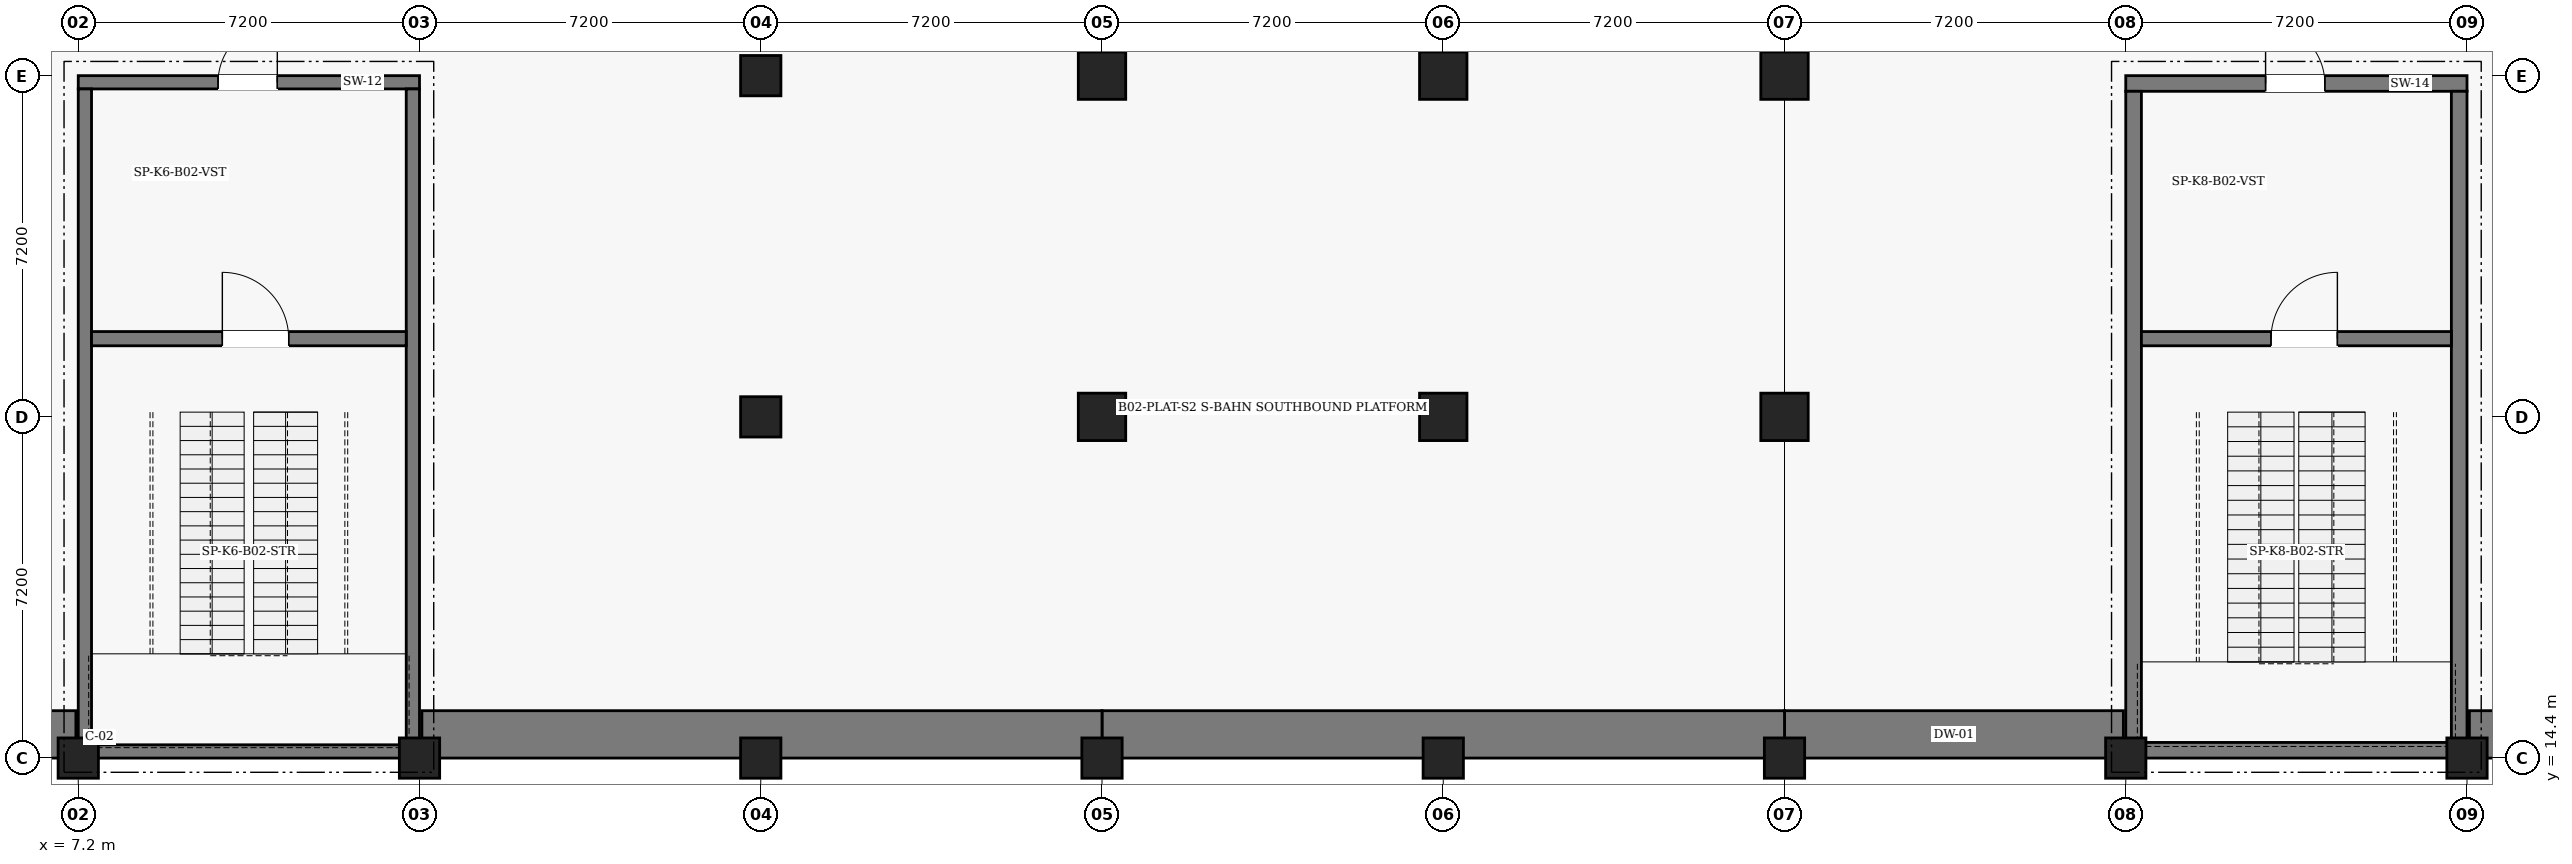
"""IFC4 building model, lengths in metres.
Left out: names, types, materials, properties, quantities, classifications, styles, units other than length and angle.
Written with IfcOpenShell. Run it as: python <this file> out.ifc"""

import sys

from ifc_helpers import new_model, si_unit, direction, frame, frame_2d, origin, origin_2d, place, context, subcontext, project, spatial, rectangle, extrude, element, fill, save


model = new_model("IFC4")
c1 = context("Model", 3, precision=1e-05, world=origin(), true_north=direction((0.0, 1.0)))
c2 = subcontext(c1, "Body", "Model", "MODEL_VIEW")
j1 = project(units=[si_unit("LENGTHUNIT", "METRE"), si_unit("PLANEANGLEUNIT", "RADIAN")], contexts=[c1])
p1 = place(None, origin())
s1 = spatial("IfcSite", under=j1, at=p1, CompositionType="ELEMENT")
p2 = place(p1, origin())
s2 = spatial("IfcBuilding", under=s1, at=p2, CompositionType="ELEMENT")
p3 = place(p2, frame((0.0, 0.0, -10.8)))
s3 = spatial("IfcBuildingStorey", under=s2, at=p3, CompositionType="ELEMENT", Elevation=-10.8)
p4 = place(p3, frame((72.0, 14.9, 0.0), z_axis=(0.0, 0.0, 1.0), x_axis=(-1.0, 0.0, 0.0)))
e1 = element("IfcWall", 1, at=p4, inside=s3, PredefinedType="USERDEFINED", context=c2, shape_type="SweptSolid", body=[
    extrude(rectangle(XDim=14.35, YDim=1.0, at=frame_2d((7.175, 0.0))), origin(), (0.0, 0.0, 1.0), 5.0),
])
p5 = place(p3, frame((50.35, 14.9, 0.0), z_axis=(0.0, 0.0, 1.0), x_axis=(-1.0, 0.0, 0.0)))
e2 = element("IfcWall", 2, at=p5, inside=s3, PredefinedType="USERDEFINED", context=c2, shape_type="SweptSolid", body=[
    extrude(rectangle(XDim=7.15, YDim=1.0, at=frame_2d((3.575, 0.0))), origin(), (0.0, 0.0, 1.0), 5.0),
])
p6 = place(p3, frame((43.2, 14.9, 0.0), z_axis=(0.0, 0.0, 1.0), x_axis=(-1.0, 0.0, 0.0)))
e3 = element("IfcWall", 3, at=p6, inside=s3, PredefinedType="USERDEFINED", context=c2, shape_type="SweptSolid", body=[
    extrude(rectangle(XDim=14.4, YDim=1.0, at=frame_2d((7.2, 0.0))), origin(), (0.0, 0.0, 1.0), 5.0),
])
p7 = place(p3, frame((28.8, 14.9, 0.0), z_axis=(0.0, 0.0, 1.0), x_axis=(-1.0, 0.0, 0.0)))
e4 = element("IfcWall", 4, at=p7, inside=s3, PredefinedType="USERDEFINED", context=c2, shape_type="SweptSolid", body=[
    extrude(rectangle(XDim=14.35, YDim=1.0, at=frame_2d((7.175, 0.0))), origin(), (0.0, 0.0, 1.0), 5.0),
])
p8 = place(p3, frame((7.15, 14.9, 0.0), z_axis=(0.0, 0.0, 1.0), x_axis=(-1.0, 0.0, 0.0)))
e5 = element("IfcWall", 5, at=p8, inside=s3, PredefinedType="USERDEFINED", context=c2, shape_type="SweptSolid", body=[
    extrude(rectangle(XDim=7.15, YDim=1.0, at=frame_2d((3.575, 0.0))), origin(), (0.0, 0.0, 1.0), 5.0),
])
p9 = place(p3, frame((7.2, 28.66, 0.0), z_axis=(0.0, 0.0, 1.0), x_axis=(1.0, 0.0, 0.0)))
e6 = element("IfcWall", 6, at=p9, inside=s3, PredefinedType="SHEAR", context=c2, shape_type="SweptSolid", body=[
    extrude(rectangle(XDim=7.2, YDim=0.28, at=frame_2d((3.6, 0.0))), origin(), (0.0, 0.0, 1.0), 5.4),
])
p10 = place(p9, frame((2.95, 0.0, 0.0)))
e7 = element("IfcOpeningElement", 7, at=p10, cuts=e6, PredefinedType="OPENING", context=c2, shape_type="SweptSolid", body=[
    extrude(rectangle(XDim=1.25, YDim=2.2, at=frame_2d((0.625, 1.1))), frame((0.0, 0.15, 0.0), z_axis=(0.0, -1.0, 0.0), x_axis=(1.0, 0.0, 0.0)), (0.0, 0.0, 1.0), 0.3),
])
p11 = place(p3, frame((14.26, 28.52, 0.0), z_axis=(0.0, 0.0, 1.0), x_axis=(0.0, -1.0, 0.0)))
e8 = element("IfcWall", 8, at=p11, inside=s3, PredefinedType="SHEAR", context=c2, shape_type="SweptSolid", body=[
    extrude(rectangle(XDim=13.84, YDim=0.28, at=frame_2d((6.92, 0.0))), origin(), (0.0, 0.0, 1.0), 5.4),
])
p12 = place(p3, frame((14.4, 14.54, 0.0), z_axis=(0.0, 0.0, 1.0), x_axis=(-1.0, 0.0, 0.0)))
e9 = element("IfcWall", 9, at=p12, inside=s3, PredefinedType="SHEAR", context=c2, shape_type="SweptSolid", body=[
    extrude(rectangle(XDim=7.2, YDim=0.28, at=frame_2d((3.6, 0.0))), origin(), (0.0, 0.0, 1.0), 5.4),
])
p13 = place(p3, frame((7.34, 14.68, 0.0), z_axis=(0.0, 0.0, 1.0), x_axis=(0.0, 1.0, 0.0)))
e10 = element("IfcWall", 10, at=p13, inside=s3, PredefinedType="SHEAR", context=c2, shape_type="SweptSolid", body=[
    extrude(rectangle(XDim=13.84, YDim=0.28, at=frame_2d((6.92, 0.0))), origin(), (0.0, 0.0, 1.0), 5.4),
])
p14 = place(p3, frame((7.48, 23.25, 0.0), z_axis=(0.0, 0.0, 1.0), x_axis=(1.0, 0.0, 0.0)))
e11 = element("IfcWall", 11, at=p14, inside=s3, PredefinedType="SHEAR", context=c2, shape_type="SweptSolid", body=[
    extrude(rectangle(XDim=6.64, YDim=0.3, at=frame_2d((3.32, 0.0))), origin(), (0.0, 0.0, 1.0), 5.4),
])
p15 = place(p14, frame((2.76, 0.0, 0.0)))
e12 = element("IfcOpeningElement", 12, at=p15, cuts=e11, PredefinedType="OPENING", context=c2, shape_type="SweptSolid", body=[
    extrude(rectangle(XDim=1.4, YDim=2.2, at=frame_2d((0.7, 1.1))), frame((0.0, 0.16, 0.0), z_axis=(0.0, -1.0, 0.0), x_axis=(1.0, 0.0, 0.0)), (0.0, 0.0, 1.0), 0.32),
])
p16 = place(p3, frame((50.4, 28.635, 0.0), z_axis=(0.0, 0.0, 1.0), x_axis=(1.0, 0.0, 0.0)))
e13 = element("IfcWall", 13, at=p16, inside=s3, PredefinedType="SHEAR", context=c2, shape_type="SweptSolid", body=[
    extrude(rectangle(XDim=7.2, YDim=0.33, at=frame_2d((3.6, 0.0))), origin(), (0.0, 0.0, 1.0), 5.4),
])
p17 = place(p16, frame((2.95, 0.0, 0.0)))
e14 = element("IfcOpeningElement", 14, at=p17, cuts=e13, PredefinedType="OPENING", context=c2, shape_type="SweptSolid", body=[
    extrude(rectangle(XDim=1.25, YDim=2.2, at=frame_2d((0.625, 1.1))), frame((0.0, 0.175, 0.0), z_axis=(0.0, -1.0, 0.0), x_axis=(1.0, 0.0, 0.0)), (0.0, 0.0, 1.0), 0.35),
])
p18 = place(p3, frame((57.435, 28.47, 0.0), z_axis=(0.0, 0.0, 1.0), x_axis=(0.0, -1.0, 0.0)))
e15 = element("IfcWall", 15, at=p18, inside=s3, PredefinedType="SHEAR", context=c2, shape_type="SweptSolid", body=[
    extrude(rectangle(XDim=13.74, YDim=0.33, at=frame_2d((6.87, 0.0))), origin(), (0.0, 0.0, 1.0), 5.4),
])
p19 = place(p3, frame((57.6, 14.565, 0.0), z_axis=(0.0, 0.0, 1.0), x_axis=(-1.0, 0.0, 0.0)))
e16 = element("IfcWall", 16, at=p19, inside=s3, PredefinedType="SHEAR", context=c2, shape_type="SweptSolid", body=[
    extrude(rectangle(XDim=7.2, YDim=0.33, at=frame_2d((3.6, 0.0))), origin(), (0.0, 0.0, 1.0), 5.4),
])
p20 = place(p3, frame((50.565, 14.73, 0.0), z_axis=(0.0, 0.0, 1.0), x_axis=(0.0, 1.0, 0.0)))
e17 = element("IfcWall", 17, at=p20, inside=s3, PredefinedType="SHEAR", context=c2, shape_type="SweptSolid", body=[
    extrude(rectangle(XDim=13.74, YDim=0.33, at=frame_2d((6.87, 0.0))), origin(), (0.0, 0.0, 1.0), 5.4),
])
p21 = place(p3, frame((50.73, 23.25, 0.0), z_axis=(0.0, 0.0, 1.0), x_axis=(1.0, 0.0, 0.0)))
e18 = element("IfcWall", 18, at=p21, inside=s3, PredefinedType="SHEAR", context=c2, shape_type="SweptSolid", body=[
    extrude(rectangle(XDim=6.54, YDim=0.3, at=frame_2d((3.27, 0.0))), origin(), (0.0, 0.0, 1.0), 5.4),
])
p22 = place(p21, frame((2.735, 0.0, 0.0)))
e19 = element("IfcOpeningElement", 19, at=p22, cuts=e18, PredefinedType="OPENING", context=c2, shape_type="SweptSolid", body=[
    extrude(rectangle(XDim=1.4, YDim=2.2, at=frame_2d((0.7, 1.1))), frame((0.0, 0.16, 0.0), z_axis=(0.0, -1.0, 0.0), x_axis=(1.0, 0.0, 0.0)), (0.0, 0.0, 1.0), 0.32),
])
for number, where, z_axis, x_axis in (
    (20, (7.2, 14.4, 0.0), (0.0, 0.0, 1.0), (1.0, 0.0, 0.0)),
    (21, (14.4, 14.4, 0.0), (0.0, 0.0, 1.0), (1.0, 0.0, 0.0)),
    (22, (21.6, 14.4, 0.0), (0.0, 0.0, 1.0), (1.0, 0.0, 0.0)),
    (23, (21.6, 21.6, 0.0), (0.0, 0.0, 1.0), (1.0, 0.0, 0.0)),
    (24, (21.6, 28.8, 0.0), (0.0, 0.0, 1.0), (1.0, 0.0, 0.0)),
    (25, (28.8, 14.4, 0.0), (0.0, 0.0, 1.0), (1.0, 0.0, 0.0)),
):
    element("IfcColumn", number, at=place(p3, frame(where, z_axis=z_axis, x_axis=x_axis)), inside=s3, PredefinedType="COLUMN", context=c2, shape_type="SweptSolid", body=[
        extrude(rectangle(XDim=0.85, YDim=0.85, at=origin_2d()), origin(), (0.0, 0.0, 1.0), 5.0),
    ])
for number, where, z_axis, x_axis in (
    (26, (28.8, 21.6, 0.0), (0.0, 0.0, 1.0), (1.0, 0.0, 0.0)),
    (27, (28.8, 28.8, 0.0), (0.0, 0.0, 1.0), (1.0, 0.0, 0.0)),
):
    element("IfcColumn", number, at=place(p3, frame(where, z_axis=z_axis, x_axis=x_axis)), inside=s3, PredefinedType="COLUMN", context=c2, shape_type="SweptSolid", body=[
        extrude(rectangle(XDim=1.0, YDim=1.0, at=origin_2d()), origin(), (0.0, 0.0, 1.0), 5.0),
    ])
p23 = place(p3, frame((36.0, 14.4, 0.0), z_axis=(0.0, 0.0, 1.0), x_axis=(1.0, 0.0, 0.0)))
e28 = element("IfcColumn", 28, at=p23, inside=s3, PredefinedType="COLUMN", context=c2, shape_type="SweptSolid", body=[
    extrude(rectangle(XDim=0.85, YDim=0.85, at=origin_2d()), origin(), (0.0, 0.0, 1.0), 5.0),
])
for number, where, z_axis, x_axis in (
    (29, (36.0, 21.6, 0.0), (0.0, 0.0, 1.0), (1.0, 0.0, 0.0)),
    (30, (36.0, 28.8, 0.0), (0.0, 0.0, 1.0), (1.0, 0.0, 0.0)),
):
    element("IfcColumn", number, at=place(p3, frame(where, z_axis=z_axis, x_axis=x_axis)), inside=s3, PredefinedType="COLUMN", context=c2, shape_type="SweptSolid", body=[
        extrude(rectangle(XDim=1.0, YDim=1.0, at=origin_2d()), origin(), (0.0, 0.0, 1.0), 5.0),
    ])
p24 = place(p3, frame((43.2, 14.4, 0.0), z_axis=(0.0, 0.0, 1.0), x_axis=(1.0, 0.0, 0.0)))
e31 = element("IfcColumn", 31, at=p24, inside=s3, PredefinedType="COLUMN", context=c2, shape_type="SweptSolid", body=[
    extrude(rectangle(XDim=0.85, YDim=0.85, at=origin_2d()), origin(), (0.0, 0.0, 1.0), 5.0),
])
for number, where, z_axis, x_axis in (
    (32, (43.2, 21.6, 0.0), (0.0, 0.0, 1.0), (1.0, 0.0, 0.0)),
    (33, (43.2, 28.8, 0.0), (0.0, 0.0, 1.0), (1.0, 0.0, 0.0)),
):
    element("IfcColumn", number, at=place(p3, frame(where, z_axis=z_axis, x_axis=x_axis)), inside=s3, PredefinedType="COLUMN", context=c2, shape_type="SweptSolid", body=[
        extrude(rectangle(XDim=1.0, YDim=1.0, at=origin_2d()), origin(), (0.0, 0.0, 1.0), 5.0),
    ])
for number, where, z_axis, x_axis in (
    (34, (50.4, 14.4, 0.0), (0.0, 0.0, 1.0), (1.0, 0.0, 0.0)),
    (35, (57.6, 14.4, 0.0), (0.0, 0.0, 1.0), (1.0, 0.0, 0.0)),
):
    element("IfcColumn", number, at=place(p3, frame(where, z_axis=z_axis, x_axis=x_axis)), inside=s3, PredefinedType="COLUMN", context=c2, shape_type="SweptSolid", body=[
        extrude(rectangle(XDim=0.85, YDim=0.85, at=origin_2d()), origin(), (0.0, 0.0, 1.0), 5.0),
    ])
p25 = place(p15, origin())
e36 = element("IfcDoor", 36, at=p25, inside=s3, OperationType="SINGLE_SWING_LEFT", PredefinedType="DOOR", context=c2, shape_type="SweptSolid", body=[
    extrude(rectangle(XDim=1.4, YDim=2.2, at=frame_2d((0.7, 1.1))), frame((0.0, 0.025, 0.0), z_axis=(0.0, -1.0, 0.0), x_axis=(1.0, 0.0, 0.0)), (0.0, 0.0, 1.0), 0.05),
])
fill(e12, e36)
p26 = place(p10, origin())
e37 = element("IfcDoor", 37, at=p26, inside=s3, OperationType="SINGLE_SWING_RIGHT", PredefinedType="DOOR", context=c2, shape_type="SweptSolid", body=[
    extrude(rectangle(XDim=1.25, YDim=2.2, at=frame_2d((0.625, 1.1))), frame((0.0, 0.025, 0.0), z_axis=(0.0, -1.0, 0.0), x_axis=(1.0, 0.0, 0.0)), (0.0, 0.0, 1.0), 0.05),
])
fill(e7, e37)
p27 = place(p22, origin())
e38 = element("IfcDoor", 38, at=p27, inside=s3, OperationType="SINGLE_SWING_RIGHT", PredefinedType="DOOR", context=c2, shape_type="SweptSolid", body=[
    extrude(rectangle(XDim=1.4, YDim=2.2, at=frame_2d((0.7, 1.1))), frame((0.0, 0.025, 0.0), z_axis=(0.0, -1.0, 0.0), x_axis=(1.0, 0.0, 0.0)), (0.0, 0.0, 1.0), 0.05),
])
fill(e19, e38)
p28 = place(p17, origin())
e39 = element("IfcDoor", 39, at=p28, inside=s3, OperationType="SINGLE_SWING_LEFT", PredefinedType="DOOR", context=c2, shape_type="SweptSolid", body=[
    extrude(rectangle(XDim=1.25, YDim=2.2, at=frame_2d((0.625, 1.1))), frame((0.0, 0.025, 0.0), z_axis=(0.0, -1.0, 0.0), x_axis=(1.0, 0.0, 0.0)), (0.0, 0.0, 1.0), 0.05),
])
fill(e14, e39)
save(model, sys.argv[1])
